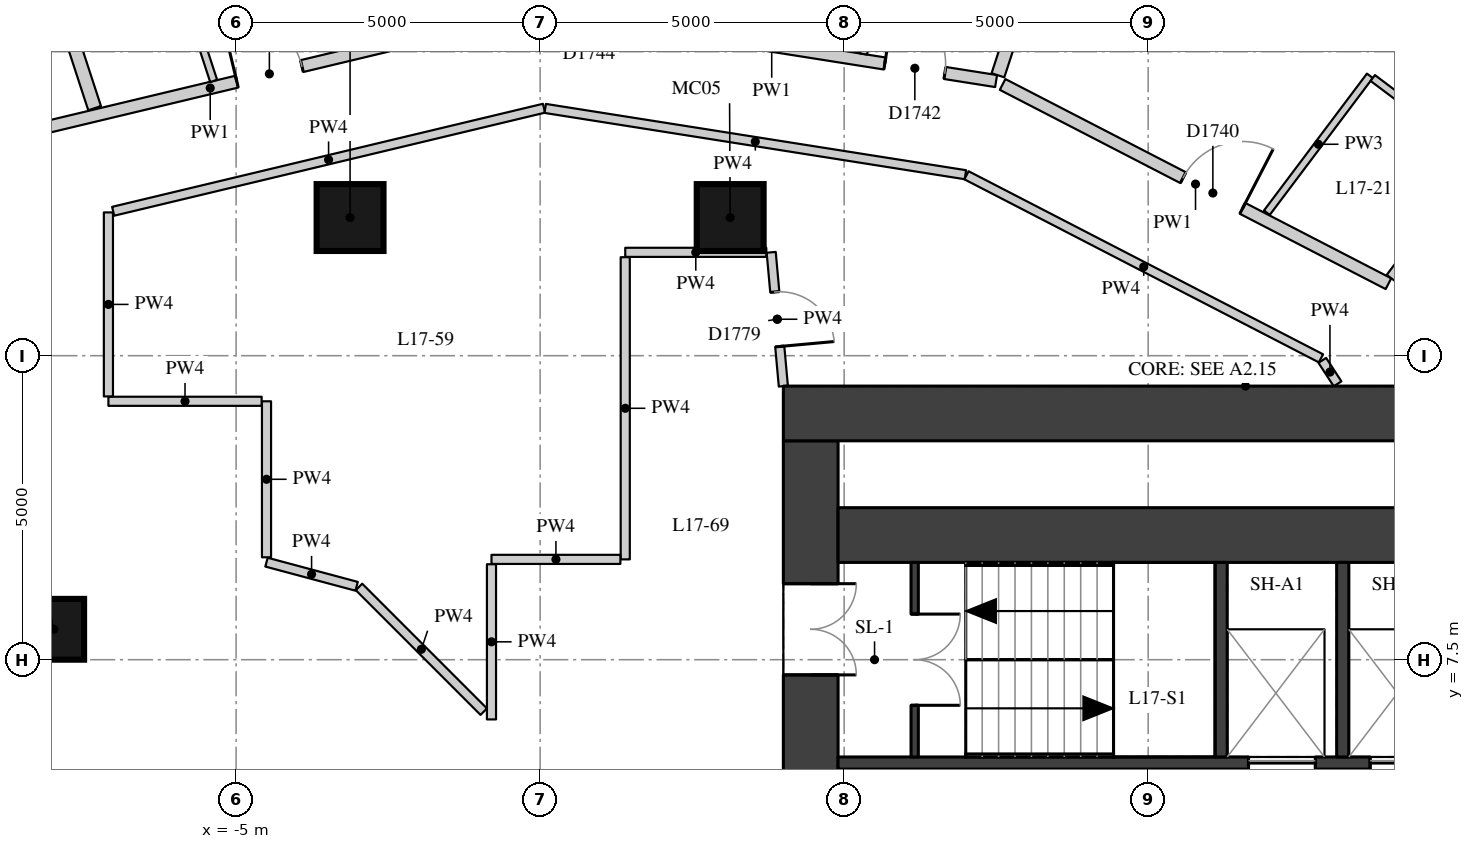
"""IFC4 building model, lengths in metres.
Left out: names, types, materials, properties, quantities, classifications, styles, units other than length and angle.
Written with IfcOpenShell. Run it as: python <this file> out.ifc"""

import sys

from ifc_helpers import new_model, si_unit, direction, frame, frame_2d, origin, origin_2d, place, context, subcontext, project, spatial, rectangle, extrude, element, fill, save


model = new_model("IFC4")
c1 = context("Model", 3, precision=1e-05, world=origin(), true_north=direction((0.0, 1.0)))
c2 = subcontext(c1, "Body", "Model", "MODEL_VIEW")
j1 = project(units=[si_unit("LENGTHUNIT", "METRE"), si_unit("PLANEANGLEUNIT", "RADIAN")], contexts=[c1])
p1 = place(None, origin())
s1 = spatial("IfcSite", under=j1, at=p1, CompositionType="ELEMENT")
p2 = place(p1, origin())
s2 = spatial("IfcBuilding", under=s1, at=p2, CompositionType="ELEMENT")
p3 = place(p2, frame((0.0, 0.0, 64.6)))
s3 = spatial("IfcBuildingStorey", under=s2, at=p3, CompositionType="ELEMENT", Elevation=64.6)
p4 = place(p3, frame((-8.0, 8.0, 0.0), z_axis=(0.0, 0.0, 1.0), x_axis=(1.0, 0.0, 0.0)))
e1 = element("IfcColumn", 1, at=p4, inside=s3, PredefinedType="COLUMN", context=c2, shape_type="SweptSolid", body=[
    extrude(rectangle(XDim=1.0, YDim=1.0, at=origin_2d()), origin(), (0.0, 0.0, 1.0), 3.3),
])
for number, where, z_axis, x_axis in (
    (2, (3.126, 14.772, 0.0), (0.0, 0.0, 1.0), (1.0, 0.0, 0.0)),
    (3, (-3.126, 14.772, 0.0), (0.0, 0.0, 1.0), (1.0, 0.0, 0.0)),
):
    element("IfcColumn", number, at=place(p3, frame(where, z_axis=z_axis, x_axis=x_axis)), inside=s3, PredefinedType="COLUMN", context=c2, shape_type="SweptSolid", body=[
        extrude(rectangle(XDim=1.1, YDim=1.1, at=origin_2d()), origin(), (0.0, 0.0, 1.0), 3.3),
    ])
p5 = place(p3, frame((4.45, -11.1, 0.0), z_axis=(0.0, 0.0, 1.0), x_axis=(0.0, 1.0, 0.0)))
e4 = element("IfcWall", 4, at=p5, inside=s3, PredefinedType="SHEAR", context=c2, shape_type="SweptSolid", body=[
    extrude(rectangle(XDim=22.2, YDim=0.9, at=frame_2d((11.1, 0.0))), origin(), (0.0, 0.0, 1.0), 3.02),
])
p6 = place(p5, frame((2.35, 0.0, 0.0)))
e5 = element("IfcOpeningElement", 5, at=p6, cuts=e4, PredefinedType="OPENING", context=c2, shape_type="SweptSolid", body=[
    extrude(rectangle(XDim=1.5, YDim=2.1, at=frame_2d((0.75, 1.05))), frame((0.0, 0.46, 0.0), z_axis=(0.0, -1.0, 0.0), x_axis=(1.0, 0.0, 0.0)), (0.0, 0.0, 1.0), 0.92),
])
p7 = place(p5, frame((5.45, 0.0, 0.0)))
e6 = element("IfcOpeningElement", 6, at=p7, cuts=e4, PredefinedType="OPENING", context=c2, shape_type="SweptSolid", body=[
    extrude(rectangle(XDim=1.8, YDim=2.1, at=frame_2d((0.9, 1.05))), frame((0.0, 0.46, 0.0), z_axis=(0.0, -1.0, 0.0), x_axis=(1.0, 0.0, 0.0)), (0.0, 0.0, 1.0), 0.92),
])
p8 = place(p5, frame((7.95, 0.0, 0.0)))
e7 = element("IfcOpeningElement", 7, at=p8, cuts=e4, PredefinedType="OPENING", context=c2, shape_type="SweptSolid", body=[
    extrude(rectangle(XDim=1.1, YDim=2.1, at=frame_2d((0.55, 1.05))), frame((0.0, 0.46, 0.0), z_axis=(0.0, -1.0, 0.0), x_axis=(1.0, 0.0, 0.0)), (0.0, 0.0, 1.0), 0.92),
])
p9 = place(p5, frame((10.6, 0.0, 0.0)))
e8 = element("IfcOpeningElement", 8, at=p9, cuts=e4, PredefinedType="OPENING", context=c2, shape_type="SweptSolid", body=[
    extrude(rectangle(XDim=1.0, YDim=2.1, at=frame_2d((0.5, 1.05))), frame((0.0, 0.46, 0.0), z_axis=(0.0, -1.0, 0.0), x_axis=(1.0, 0.0, 0.0)), (0.0, 0.0, 1.0), 0.92),
])
p10 = place(p5, frame((13.15, 0.0, 0.0)))
e9 = element("IfcOpeningElement", 9, at=p10, cuts=e4, PredefinedType="OPENING", context=c2, shape_type="SweptSolid", body=[
    extrude(rectangle(XDim=1.1, YDim=2.1, at=frame_2d((0.55, 1.05))), frame((0.0, 0.46, 0.0), z_axis=(0.0, -1.0, 0.0), x_axis=(1.0, 0.0, 0.0)), (0.0, 0.0, 1.0), 0.92),
])
p11 = place(p5, frame((14.95, 0.0, 0.0)))
e10 = element("IfcOpeningElement", 10, at=p11, cuts=e4, PredefinedType="OPENING", context=c2, shape_type="SweptSolid", body=[
    extrude(rectangle(XDim=1.8, YDim=2.1, at=frame_2d((0.9, 1.05))), frame((0.0, 0.46, 0.0), z_axis=(0.0, -1.0, 0.0), x_axis=(1.0, 0.0, 0.0)), (0.0, 0.0, 1.0), 0.92),
])
p12 = place(p5, frame((18.35, 0.0, 0.0)))
e11 = element("IfcOpeningElement", 11, at=p12, cuts=e4, PredefinedType="OPENING", context=c2, shape_type="SweptSolid", body=[
    extrude(rectangle(XDim=1.5, YDim=2.1, at=frame_2d((0.75, 1.05))), frame((0.0, 0.46, 0.0), z_axis=(0.0, -1.0, 0.0), x_axis=(1.0, 0.0, 0.0)), (0.0, 0.0, 1.0), 0.92),
])
p13 = place(p3, frame((4.0, 11.55, 0.0), z_axis=(0.0, 0.0, 1.0), x_axis=(1.0, 0.0, 0.0)))
e12 = element("IfcWall", 12, at=p13, inside=s3, PredefinedType="SHEAR", context=c2, shape_type="SweptSolid", body=[
    extrude(rectangle(XDim=15.2, YDim=0.9, at=frame_2d((7.6, 0.0))), origin(), (0.0, 0.0, 1.0), 3.02),
])
p14 = place(p3, frame((4.9, 9.55, 0.0), z_axis=(0.0, 0.0, 1.0), x_axis=(1.0, 0.0, 0.0)))
e13 = element("IfcWall", 13, at=p14, inside=s3, PredefinedType="SHEAR", context=c2, shape_type="SweptSolid", body=[
    extrude(rectangle(XDim=10.2, YDim=0.9, at=frame_2d((5.1, 0.0))), origin(), (0.0, 0.0, 1.0), 3.02),
])
p15 = place(p3, frame((4.9, 5.8, 0.0), z_axis=(0.0, 0.0, 1.0), x_axis=(1.0, 0.0, 0.0)))
e14 = element("IfcWall", 14, at=p15, inside=s3, PredefinedType="SHEAR", context=c2, shape_type="SweptSolid", body=[
    extrude(rectangle(XDim=10.2, YDim=0.2, at=frame_2d((5.1, 0.0))), origin(), (0.0, 0.0, 1.0), 3.02),
])
p16 = place(p15, frame((6.75, 0.0, 0.0)))
e15 = element("IfcOpeningElement", 15, at=p16, cuts=e14, PredefinedType="OPENING", context=c2, shape_type="SweptSolid", body=[
    extrude(rectangle(XDim=1.1, YDim=2.1, at=frame_2d((0.55, 1.05))), frame((0.0, 0.11, 0.0), z_axis=(0.0, -1.0, 0.0), x_axis=(1.0, 0.0, 0.0)), (0.0, 0.0, 1.0), 0.22),
])
p17 = place(p15, frame((8.75, 0.0, 0.0)))
e16 = element("IfcOpeningElement", 16, at=p17, cuts=e14, PredefinedType="OPENING", context=c2, shape_type="SweptSolid", body=[
    extrude(rectangle(XDim=1.1, YDim=2.1, at=frame_2d((0.55, 1.05))), frame((0.0, 0.11, 0.0), z_axis=(0.0, -1.0, 0.0), x_axis=(1.0, 0.0, 0.0)), (0.0, 0.0, 1.0), 0.22),
])
for number, where, z_axis, x_axis in (
    (17, (11.2, 5.9, 0.0), (0.0, 0.0, 1.0), (0.0, 1.0, 0.0)),
    (18, (13.2, 5.9, 0.0), (0.0, 0.0, 1.0), (0.0, 1.0, 0.0)),
):
    element("IfcWall", number, at=place(p3, frame(where, z_axis=z_axis, x_axis=x_axis)), inside=s3, PredefinedType="SHEAR", context=c2, shape_type="SweptSolid", body=[
        extrude(rectangle(XDim=3.2, YDim=0.2, at=frame_2d((1.6, 0.0))), origin(), (0.0, 0.0, 1.0), 3.02),
    ])
p18 = place(p3, frame((6.16, 5.9, 0.0), z_axis=(0.0, 0.0, 1.0), x_axis=(0.0, 1.0, 0.0)))
e19 = element("IfcWall", 19, at=p18, inside=s3, PredefinedType="SHEAR", context=c2, shape_type="SweptSolid", body=[
    extrude(rectangle(XDim=3.2, YDim=0.12, at=frame_2d((1.6, 0.0))), origin(), (0.0, 0.0, 1.0), 3.02),
])
p19 = place(p18, frame((0.85, 0.0, 0.0)))
e20 = element("IfcOpeningElement", 20, at=p19, cuts=e19, PredefinedType="OPENING", context=c2, shape_type="SweptSolid", body=[
    extrude(rectangle(XDim=1.5, YDim=2.1, at=frame_2d((0.75, 1.05))), frame((0.0, 0.07, 0.0), z_axis=(0.0, -1.0, 0.0), x_axis=(1.0, 0.0, 0.0)), (0.0, 0.0, 1.0), 0.14),
])
p20 = place(p3, frame((-10.852, 15.605, 0.0), z_axis=(0.0, 0.0, 1.0), x_axis=(0.972573296372, 0.232596610431, 0.0)))
e21 = element("IfcWall", 21, at=p20, inside=s3, PredefinedType="PARTITIONING", context=c2, shape_type="SweptSolid", body=[
    extrude(rectangle(XDim=11.157, YDim=0.2, at=frame_2d((5.579, 0.0))), origin(), (0.0, 0.0, 1.0), 3.02),
])
p21 = place(p20, frame((6.029, 0.0, 0.0)))
e22 = element("IfcOpeningElement", 22, at=p21, cuts=e21, PredefinedType="OPENING", context=c2, shape_type="SweptSolid", body=[
    extrude(rectangle(XDim=1.1, YDim=2.1, at=frame_2d((0.55, 1.05))), frame((0.0, 0.11, 0.0), z_axis=(0.0, -1.0, 0.0), x_axis=(1.0, 0.0, 0.0)), (0.0, 0.0, 1.0), 0.22),
])
p22 = place(p20, frame((0.705, 0.0, 0.0)))
e23 = element("IfcOpeningElement", 23, at=p22, cuts=e21, PredefinedType="OPENING", context=c2, shape_type="SweptSolid", body=[
    extrude(rectangle(XDim=1.0, YDim=2.1, at=frame_2d((0.5, 1.05))), frame((0.0, 0.11, 0.0), z_axis=(0.0, -1.0, 0.0), x_axis=(1.0, 0.0, 0.0)), (0.0, 0.0, 1.0), 0.22),
])
p23 = place(p3, frame((0.119, 18.181, 0.0), z_axis=(0.0, 0.0, 1.0), x_axis=(0.987788122462, -0.155803161464, 0.0)))
e24 = element("IfcWall", 24, at=p23, inside=s3, PredefinedType="PARTITIONING", context=c2, shape_type="SweptSolid", body=[
    extrude(rectangle(XDim=7.471, YDim=0.2, at=frame_2d((3.736, 0.0))), origin(), (0.0, 0.0, 1.0), 3.02),
])
p24 = place(p23, frame((5.619, 0.0, 0.0)))
e25 = element("IfcOpeningElement", 25, at=p24, cuts=e24, PredefinedType="OPENING", context=c2, shape_type="SweptSolid", body=[
    extrude(rectangle(XDim=1.0, YDim=2.1, at=frame_2d((0.5, 1.05))), frame((0.0, 0.11, 0.0), z_axis=(0.0, -1.0, 0.0), x_axis=(1.0, 0.0, 0.0)), (0.0, 0.0, 1.0), 0.22),
])
p25 = place(p23, frame((0.732, 0.0, 0.0)))
e26 = element("IfcOpeningElement", 26, at=p25, cuts=e24, PredefinedType="OPENING", context=c2, shape_type="SweptSolid", body=[
    extrude(rectangle(XDim=1.0, YDim=2.1, at=frame_2d((0.5, 1.05))), frame((0.0, 0.11, 0.0), z_axis=(0.0, -1.0, 0.0), x_axis=(1.0, 0.0, 0.0)), (0.0, 0.0, 1.0), 0.22),
])
p26 = place(p3, frame((7.606, 16.961, 0.0), z_axis=(0.0, 0.0, 1.0), x_axis=(0.888519518851, -0.45883882205, 0.0)))
e27 = element("IfcWall", 27, at=p26, inside=s3, PredefinedType="PARTITIONING", context=c2, shape_type="SweptSolid", body=[
    extrude(rectangle(XDim=7.142, YDim=0.2, at=frame_2d((3.571, 0.0))), origin(), (0.0, 0.0, 1.0), 3.02),
])
p27 = place(p26, frame((3.342, 0.0, 0.0)))
e28 = element("IfcOpeningElement", 28, at=p27, cuts=e27, PredefinedType="OPENING", context=c2, shape_type="SweptSolid", body=[
    extrude(rectangle(XDim=1.1, YDim=2.1, at=frame_2d((0.55, 1.05))), frame((0.0, 0.11, 0.0), z_axis=(0.0, -1.0, 0.0), x_axis=(1.0, 0.0, 0.0)), (0.0, 0.0, 1.0), 0.22),
])
p28 = place(p3, frame((4.0, 11.999, 0.0), z_axis=(0.0, 0.0, 1.0), x_axis=(-0.090475982725, 0.995898637689, 0.0)))
e29 = element("IfcWall", 29, at=p28, inside=s3, PredefinedType="PARTITIONING", context=c2, shape_type="SweptSolid", body=[
    extrude(rectangle(XDim=2.21, YDim=0.15, at=frame_2d((1.105, 0.0))), origin(), (0.0, 0.0, 1.0), 3.02),
])
p29 = place(p28, frame((0.655, 0.0, 0.0)))
e30 = element("IfcOpeningElement", 30, at=p29, cuts=e29, PredefinedType="OPENING", context=c2, shape_type="SweptSolid", body=[
    extrude(rectangle(XDim=0.9, YDim=2.1, at=frame_2d((0.45, 1.05))), frame((0.0, 0.085, 0.0), z_axis=(0.0, -1.0, 0.0), x_axis=(1.0, 0.0, 0.0)), (0.0, 0.0, 1.0), 0.17),
])
p30 = place(p3, frame((3.72, 14.2, 0.0), z_axis=(0.0, 0.0, 1.0), x_axis=(-1.0, 0.0, 0.0)))
e31 = element("IfcWall", 31, at=p30, inside=s3, PredefinedType="PARTITIONING", context=c2, shape_type="SweptSolid", body=[
    extrude(rectangle(XDim=2.32, YDim=0.15, at=frame_2d((1.16, 0.0))), origin(), (0.0, 0.0, 1.0), 3.02),
])
p31 = place(p3, frame((1.4, 14.12, 0.0), z_axis=(0.0, 0.0, 1.0), x_axis=(0.0, -1.0, 0.0)))
e32 = element("IfcWall", 32, at=p31, inside=s3, PredefinedType="PARTITIONING", context=c2, shape_type="SweptSolid", body=[
    extrude(rectangle(XDim=4.97, YDim=0.15, at=frame_2d((2.485, 0.0))), origin(), (0.0, 0.0, 1.0), 3.02),
])
p32 = place(p3, frame((1.32, 9.15, 0.0), z_axis=(0.0, 0.0, 1.0), x_axis=(-1.0, 0.0, 0.0)))
e33 = element("IfcWall", 33, at=p32, inside=s3, PredefinedType="PARTITIONING", context=c2, shape_type="SweptSolid", body=[
    extrude(rectangle(XDim=2.12, YDim=0.15, at=frame_2d((1.06, 0.0))), origin(), (0.0, 0.0, 1.0), 3.02),
])
p33 = place(p3, frame((-0.8, 9.07, 0.0), z_axis=(0.0, 0.0, 1.0), x_axis=(0.0, -1.0, 0.0)))
e34 = element("IfcWall", 34, at=p33, inside=s3, PredefinedType="PARTITIONING", context=c2, shape_type="SweptSolid", body=[
    extrude(rectangle(XDim=2.552, YDim=0.15, at=frame_2d((1.276, 0.0))), origin(), (0.0, 0.0, 1.0), 3.02),
])
p34 = place(p3, frame((-0.927, 6.645, 0.0), z_axis=(0.0, 0.0, 1.0), x_axis=(-0.707106781187, 0.707106781187, 0.0)))
e35 = element("IfcWall", 35, at=p34, inside=s3, PredefinedType="PARTITIONING", context=c2, shape_type="SweptSolid", body=[
    extrude(rectangle(XDim=2.901, YDim=0.15, at=frame_2d((1.451, 0.0))), origin(), (0.0, 0.0, 1.0), 3.02),
])
p35 = place(p3, frame((-3.018, 8.707, 0.0), z_axis=(0.0, 0.0, 1.0), x_axis=(-0.965925329025, 0.25882090091, 0.0)))
e36 = element("IfcWall", 36, at=p35, inside=s3, PredefinedType="PARTITIONING", context=c2, shape_type="SweptSolid", body=[
    extrude(rectangle(XDim=1.535, YDim=0.15, at=frame_2d((0.767, 0.0))), origin(), (0.0, 0.0, 1.0), 3.02),
])
p36 = place(p3, frame((-4.5, 9.184, 0.0), z_axis=(0.0, 0.0, 1.0), x_axis=(0.0, 1.0, 0.0)))
e37 = element("IfcWall", 37, at=p36, inside=s3, PredefinedType="PARTITIONING", context=c2, shape_type="SweptSolid", body=[
    extrude(rectangle(XDim=2.566, YDim=0.15, at=frame_2d((1.283, 0.0))), origin(), (0.0, 0.0, 1.0), 3.02),
])
p37 = place(p3, frame((-4.58, 11.75, 0.0), z_axis=(0.0, 0.0, 1.0), x_axis=(-1.0, 0.0, 0.0)))
e38 = element("IfcWall", 38, at=p37, inside=s3, PredefinedType="PARTITIONING", context=c2, shape_type="SweptSolid", body=[
    extrude(rectangle(XDim=2.52, YDim=0.15, at=frame_2d((1.26, 0.0))), origin(), (0.0, 0.0, 1.0), 3.02),
])
p38 = place(p3, frame((-7.1, 11.83, 0.0), z_axis=(0.0, 0.0, 1.0), x_axis=(0.0, 1.0, 0.0)))
e39 = element("IfcWall", 39, at=p38, inside=s3, PredefinedType="PARTITIONING", context=c2, shape_type="SweptSolid", body=[
    extrude(rectangle(XDim=3.027, YDim=0.15, at=frame_2d((1.513, 0.0))), origin(), (0.0, 0.0, 1.0), 3.02),
])
p39 = place(p3, frame((-7.022, 14.875, 0.0), z_axis=(0.0, 0.0, 1.0), x_axis=(0.972565872543, 0.232627650043, 0.0)))
e40 = element("IfcWall", 40, at=p39, inside=s3, PredefinedType="PARTITIONING", context=c2, shape_type="SweptSolid", body=[
    extrude(rectangle(XDim=7.286, YDim=0.15, at=frame_2d((3.643, 0.0))), origin(), (0.0, 0.0, 1.0), 3.02),
])
p40 = place(p3, frame((0.083, 16.567, 0.0), z_axis=(0.0, 0.0, 1.0), x_axis=(0.987781067139, -0.15584788546, 0.0)))
e41 = element("IfcWall", 41, at=p40, inside=s3, PredefinedType="PARTITIONING", context=c2, shape_type="SweptSolid", body=[
    extrude(rectangle(XDim=6.996, YDim=0.15, at=frame_2d((3.498, 0.0))), origin(), (0.0, 0.0, 1.0), 3.02),
])
p41 = place(p3, frame((7.012, 15.467, 0.0), z_axis=(0.0, 0.0, 1.0), x_axis=(0.888509096081, -0.458859004685, 0.0)))
e42 = element("IfcWall", 42, at=p41, inside=s3, PredefinedType="PARTITIONING", context=c2, shape_type="SweptSolid", body=[
    extrude(rectangle(XDim=6.561, YDim=0.15, at=frame_2d((3.281, 0.0))), origin(), (0.0, 0.0, 1.0), 3.02),
])
p42 = place(p3, frame((12.864, 12.423, 0.0), z_axis=(0.0, 0.0, 1.0), x_axis=(0.545733799108, -0.837958603101, 0.0)))
e43 = element("IfcWall", 43, at=p42, inside=s3, PredefinedType="PARTITIONING", context=c2, shape_type="SweptSolid", body=[
    extrude(rectangle(XDim=0.46, YDim=0.15, at=frame_2d((0.23, 0.0))), origin(), (0.0, 0.0, 1.0), 3.02),
])
p43 = place(p3, frame((16.927, 17.638, 0.0), z_axis=(0.0, 0.0, 1.0), x_axis=(-0.601159395391, -0.799129139334, 0.0)))
e44 = element("IfcWall", 44, at=p43, inside=s3, PredefinedType="PARTITIONING", context=c2, shape_type="SweptSolid", body=[
    extrude(rectangle(XDim=4.849, YDim=0.22, at=frame_2d((2.425, 0.0))), origin(), (0.0, 0.0, 1.0), 3.02),
])
p44 = place(p3, frame((9.034, 21.721, 0.0), z_axis=(0.0, 0.0, 1.0), x_axis=(-0.310330277344, -0.95062880188, 0.0)))
e45 = element("IfcWall", 45, at=p44, inside=s3, PredefinedType="PARTITIONING", context=c2, shape_type="SweptSolid", body=[
    extrude(rectangle(XDim=4.848, YDim=0.22, at=frame_2d((2.424, 0.0))), origin(), (0.0, 0.0, 1.0), 3.02),
])
p45 = place(p3, frame((-9.429, 23.014, 0.0), z_axis=(0.0, 0.0, 1.0), x_axis=(0.310223739243, -0.950663574357, 0.0)))
e46 = element("IfcWall", 46, at=p45, inside=s3, PredefinedType="PARTITIONING", context=c2, shape_type="SweptSolid", body=[
    extrude(rectangle(XDim=6.778, YDim=0.22, at=frame_2d((3.389, 0.0))), origin(), (0.0, 0.0, 1.0), 3.02),
])
p46 = place(p3, frame((11.952, 14.852, 0.0), z_axis=(0.0, 0.0, 1.0), x_axis=(0.60115003842, 0.7991361782, 0.0)))
e47 = element("IfcWall", 47, at=p46, inside=s3, PredefinedType="PARTITIONING", context=c2, shape_type="SweptSolid", body=[
    extrude(rectangle(XDim=2.818, YDim=0.12, at=frame_2d((1.409, 0.0))), origin(), (0.0, 0.0, 1.0), 3.02),
])
p47 = place(p3, frame((5.318, 17.462, 0.0), z_axis=(0.0, 0.0, 1.0), x_axis=(0.156077517275, 0.987744809453, 0.0)))
e48 = element("IfcWall", 48, at=p47, inside=s3, PredefinedType="PARTITIONING", context=c2, shape_type="SweptSolid", body=[
    extrude(rectangle(XDim=2.399, YDim=0.12, at=frame_2d((1.2, 0.0))), origin(), (0.0, 0.0, 1.0), 3.02),
])
p48 = place(p3, frame((-5.369, 17.019, 0.0), z_axis=(0.0, 0.0, 1.0), x_axis=(-0.310231838646, 0.950660931295, 0.0)))
e49 = element("IfcWall", 49, at=p48, inside=s3, PredefinedType="PARTITIONING", context=c2, shape_type="SweptSolid", body=[
    extrude(rectangle(XDim=2.861, YDim=0.12, at=frame_2d((1.431, 0.0))), origin(), (0.0, 0.0, 1.0), 3.02),
])
p49 = place(p3, frame((13.694, 17.067, 0.0), z_axis=(0.0, 0.0, 1.0), x_axis=(0.799118870394, -0.601173045786, 0.0)))
e50 = element("IfcWall", 50, at=p49, inside=s3, PredefinedType="PARTITIONING", context=c2, shape_type="SweptSolid", body=[
    extrude(rectangle(XDim=2.13, YDim=0.12, at=frame_2d((1.065, 0.0))), origin(), (0.0, 0.0, 1.0), 3.02),
])
p50 = place(p49, frame((0.59, 0.0, 0.0)))
e51 = element("IfcOpeningElement", 51, at=p50, cuts=e50, PredefinedType="OPENING", context=c2, shape_type="SweptSolid", body=[
    extrude(rectangle(XDim=1.0, YDim=2.1, at=frame_2d((0.5, 1.05))), frame((0.0, 0.07, 0.0), z_axis=(0.0, -1.0, 0.0), x_axis=(1.0, 0.0, 0.0)), (0.0, 0.0, 1.0), 0.14),
])
p51 = place(p12, origin())
e52 = element("IfcDoor", 52, at=p51, inside=s3, OperationType="DOUBLE_DOOR_SINGLE_SWING", PredefinedType="DOOR", context=c2, shape_type="SweptSolid", body=[
    extrude(rectangle(XDim=1.5, YDim=2.1, at=frame_2d((0.75, 1.05))), frame((0.0, 0.025, 0.0), z_axis=(0.0, -1.0, 0.0), x_axis=(1.0, 0.0, 0.0)), (0.0, 0.0, 1.0), 0.05),
])
fill(e11, e52)
p52 = place(p19, origin())
e53 = element("IfcDoor", 53, at=p52, inside=s3, OperationType="DOUBLE_DOOR_SINGLE_SWING", PredefinedType="DOOR", context=c2, shape_type="SweptSolid", body=[
    extrude(rectangle(XDim=1.5, YDim=2.1, at=frame_2d((0.75, 1.05))), frame((0.0, 0.025, 0.0), z_axis=(0.0, -1.0, 0.0), x_axis=(1.0, 0.0, 0.0)), (0.0, 0.0, 1.0), 0.05),
])
fill(e20, e53)
p53 = place(p16, origin())
e54 = element("IfcDoor", 54, at=p53, inside=s3, OperationType="DOUBLE_DOOR_SLIDING", PredefinedType="DOOR", context=c2, shape_type="SweptSolid", body=[
    extrude(rectangle(XDim=1.1, YDim=2.1, at=frame_2d((0.55, 1.05))), frame((0.0, 0.025, 0.0), z_axis=(0.0, -1.0, 0.0), x_axis=(1.0, 0.0, 0.0)), (0.0, 0.0, 1.0), 0.05),
])
fill(e15, e54)
p54 = place(p17, origin())
e55 = element("IfcDoor", 55, at=p54, inside=s3, OperationType="DOUBLE_DOOR_SLIDING", PredefinedType="DOOR", context=c2, shape_type="SweptSolid", body=[
    extrude(rectangle(XDim=1.1, YDim=2.1, at=frame_2d((0.55, 1.05))), frame((0.0, 0.025, 0.0), z_axis=(0.0, -1.0, 0.0), x_axis=(1.0, 0.0, 0.0)), (0.0, 0.0, 1.0), 0.05),
])
fill(e16, e55)
p55 = place(p27, origin())
e56 = element("IfcDoor", 56, at=p55, inside=s3, OperationType="SINGLE_SWING_RIGHT", PredefinedType="DOOR", context=c2, shape_type="SweptSolid", body=[
    extrude(rectangle(XDim=1.1, YDim=2.1, at=frame_2d((0.55, 1.05))), frame((0.0, 0.025, 0.0), z_axis=(0.0, -1.0, 0.0), x_axis=(1.0, 0.0, 0.0)), (0.0, 0.0, 1.0), 0.05),
])
fill(e28, e56)
p56 = place(p24, origin())
e57 = element("IfcDoor", 57, at=p56, inside=s3, OperationType="SINGLE_SWING_LEFT", PredefinedType="DOOR", context=c2, shape_type="SweptSolid", body=[
    extrude(rectangle(XDim=1.0, YDim=2.1, at=frame_2d((0.5, 1.05))), frame((0.0, 0.025, 0.0), z_axis=(0.0, -1.0, 0.0), x_axis=(1.0, 0.0, 0.0)), (0.0, 0.0, 1.0), 0.05),
])
fill(e25, e57)
p57 = place(p21, origin())
e58 = element("IfcDoor", 58, at=p57, inside=s3, OperationType="SINGLE_SWING_LEFT", PredefinedType="DOOR", context=c2, shape_type="SweptSolid", body=[
    extrude(rectangle(XDim=1.1, YDim=2.1, at=frame_2d((0.55, 1.05))), frame((0.0, 0.025, 0.0), z_axis=(0.0, -1.0, 0.0), x_axis=(1.0, 0.0, 0.0)), (0.0, 0.0, 1.0), 0.05),
])
fill(e22, e58)
p58 = place(p29, origin())
e59 = element("IfcDoor", 59, at=p58, inside=s3, OperationType="SINGLE_SWING_RIGHT", PredefinedType="DOOR", context=c2, shape_type="SweptSolid", body=[
    extrude(rectangle(XDim=0.9, YDim=2.1, at=frame_2d((0.45, 1.05))), frame((0.0, 0.025, 0.0), z_axis=(0.0, -1.0, 0.0), x_axis=(1.0, 0.0, 0.0)), (0.0, 0.0, 1.0), 0.05),
])
fill(e30, e59)
save(model, sys.argv[1])
